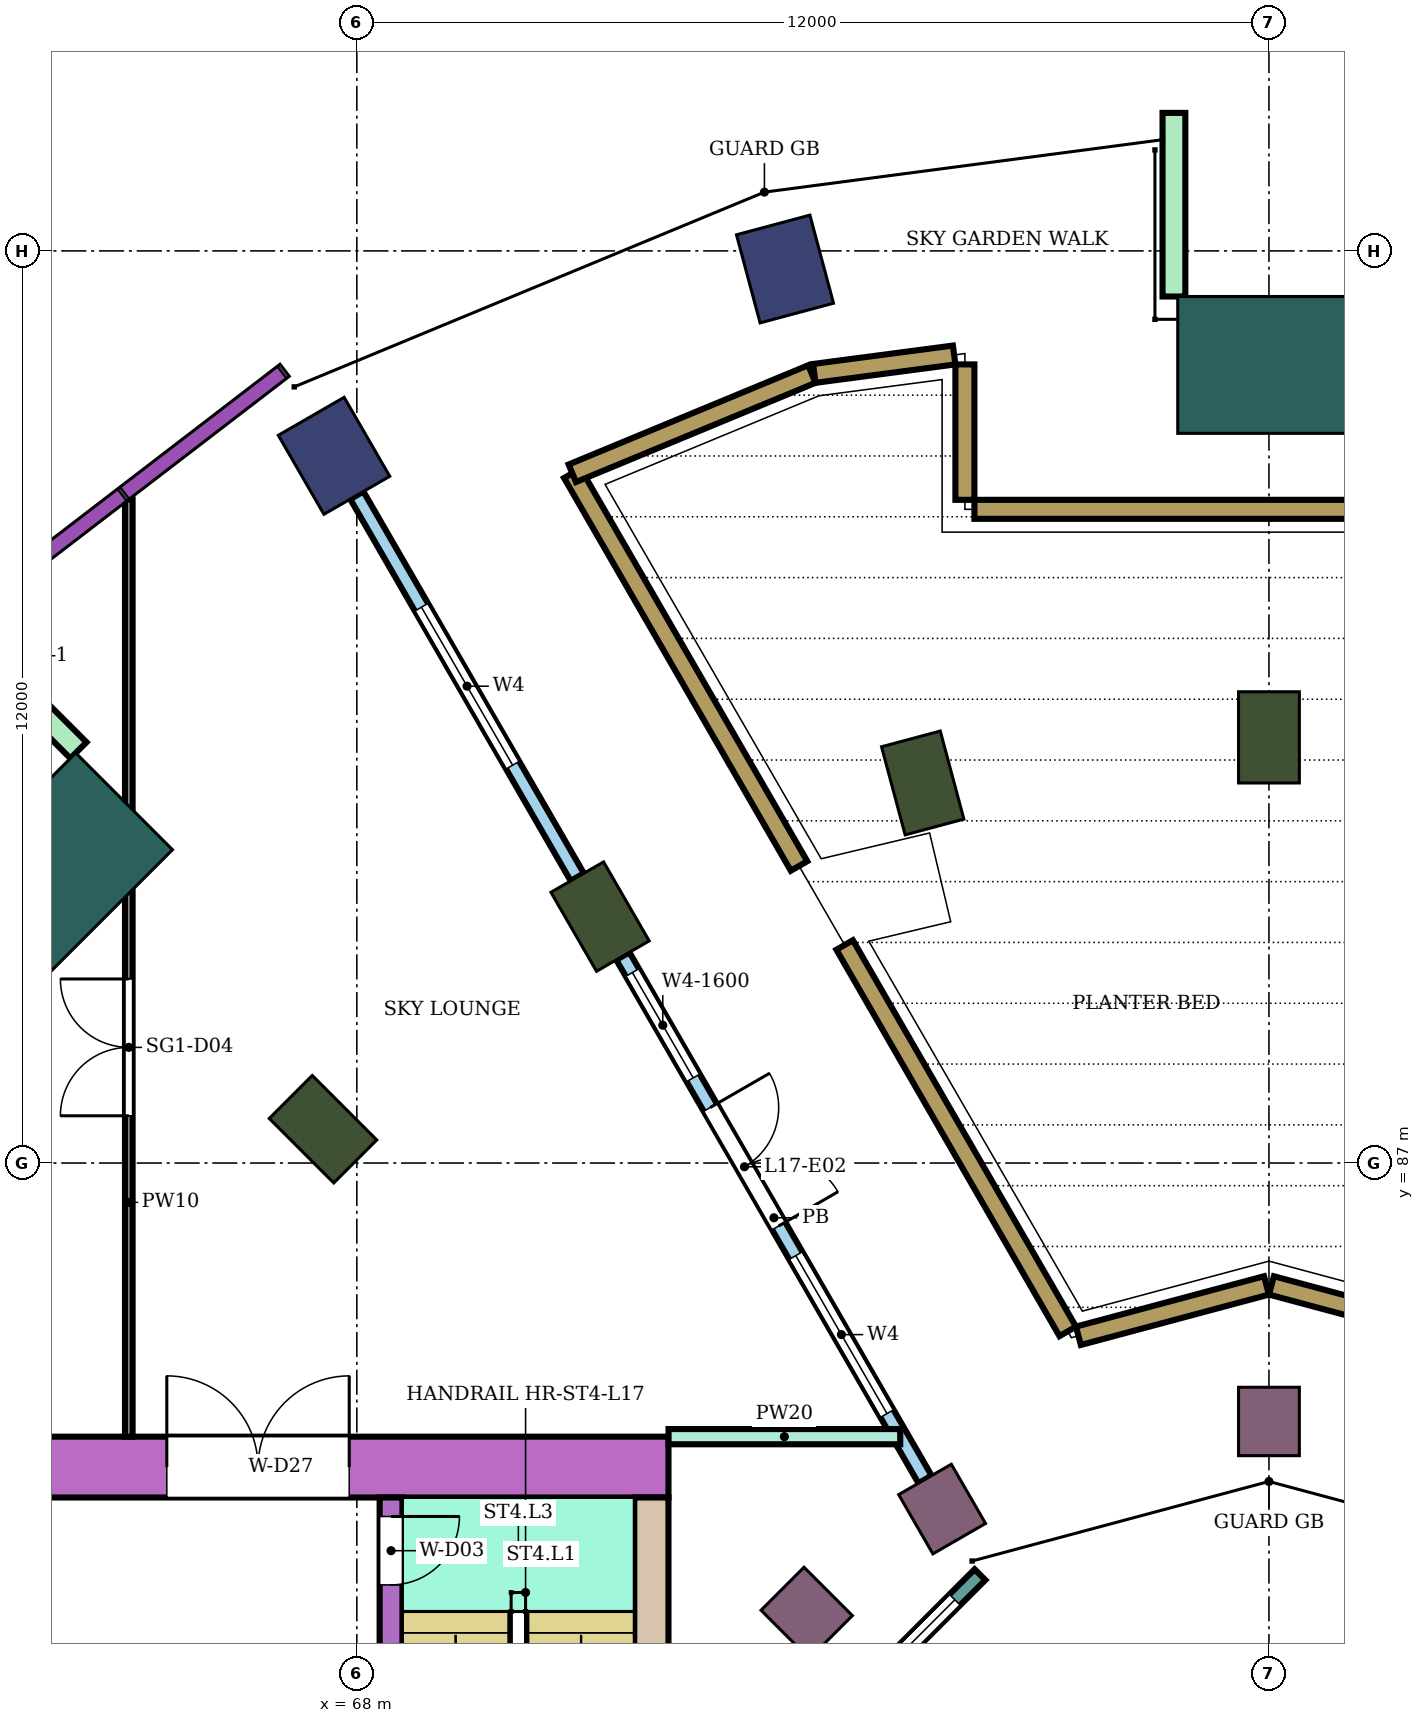
"""IFC4 building model, lengths in metres.
Left out: names, types, materials, properties, quantities, classifications, styles, units other than length and angle.
Written with IfcOpenShell. Run it as: python <this file> out.ifc"""

import sys

from ifc_helpers import new_model, si_unit, direction, frame, frame_2d, origin, origin_2d, place, context, subcontext, project, spatial, rectangle, extrude, element, fill, save


model = new_model("IFC4")
c1 = context("Model", 3, precision=1e-05, world=origin(), true_north=direction((0.0, 1.0)))
c2 = subcontext(c1, "Body", "Model", "MODEL_VIEW")
j1 = project(units=[si_unit("LENGTHUNIT", "METRE"), si_unit("PLANEANGLEUNIT", "RADIAN")], contexts=[c1])
p1 = place(None, origin())
s1 = spatial("IfcSite", under=j1, at=p1, CompositionType="ELEMENT")
p2 = place(p1, origin())
s2 = spatial("IfcBuilding", under=s1, at=p2, CompositionType="ELEMENT")
p3 = place(p2, frame((0.0, 0.0, 74.4)))
s3 = spatial("IfcBuildingStorey", under=s2, at=p3, CompositionType="ELEMENT", Elevation=74.4)
for number, where, z_axis, x_axis in (
    (1, (73.633, 98.762, 0.0), (0.0, 0.0, 1.0), (-0.259, 0.966, 0.0)),
    (2, (67.7, 96.304, 0.0), (0.0, 0.0, 1.0), (-0.5, 0.866, 0.0)),
):
    element("IfcColumn", number, at=place(p3, frame(where, z_axis=z_axis, x_axis=x_axis)), inside=s3, PredefinedType="COLUMN", context=c2, shape_type="SweptSolid", body=[
        extrude(rectangle(XDim=1.2, YDim=1.0, at=origin_2d()), origin(), (0.0, 0.0, 1.0), 8.0),
    ])
for number, where, z_axis, x_axis in (
    (3, (80.0, 92.6, 0.0), (0.0, 0.0, 1.0), (0.0, 1.0, 0.0)),
    (4, (75.445, 92.0, 0.0), (0.0, 0.0, 1.0), (-0.259, 0.966, 0.0)),
    (5, (71.2, 90.242, 0.0), (0.0, 0.0, 1.0), (-0.5, 0.866, 0.0)),
    (6, (67.555, 87.445, 0.0), (0.0, 0.0, 1.0), (-0.707, 0.707, 0.0)),
):
    element("IfcColumn", number, at=place(p3, frame(where, z_axis=z_axis, x_axis=x_axis)), inside=s3, PredefinedType="COLUMN", context=c2, shape_type="SweptSolid", body=[
        extrude(rectangle(XDim=1.2, YDim=0.8, at=origin_2d()), origin(), (0.0, 0.0, 1.0), 8.0),
    ])
for number, where, z_axis, x_axis in (
    (7, (80.0, 83.6, 0.0), (0.0, 0.0, 1.0), (0.0, 1.0, 0.0)),
    (8, (75.7, 82.448, 0.0), (0.0, 0.0, 1.0), (-0.5, 0.866, 0.0)),
    (9, (73.919, 81.081, 0.0), (0.0, 0.0, 1.0), (-0.707, 0.707, 0.0)),
):
    element("IfcColumn", number, at=place(p3, frame(where, z_axis=z_axis, x_axis=x_axis)), inside=s3, PredefinedType="COLUMN", context=c2, shape_type="SweptSolid", body=[
        extrude(rectangle(XDim=0.9, YDim=0.8, at=origin_2d()), origin(), (0.0, 0.0, 1.0), 8.0),
    ])
for number, where, z_axis, x_axis in (
    (10, (80.0, 97.5, 0.0), (0.0, 0.0, 1.0), (0.0, 1.0, 0.0)),
    (11, (64.09, 90.91, 0.0), (0.0, 0.0, 1.0), (-0.707, 0.707, 0.0)),
):
    element("IfcColumn", number, at=place(p3, frame(where, z_axis=z_axis, x_axis=x_axis)), inside=s3, PredefinedType="COLUMN", context=c2, shape_type="SweptSolid", body=[
        extrude(rectangle(XDim=1.8, YDim=2.4, at=origin_2d()), origin(), (0.0, 0.0, 1.0), 8.0),
    ])
p4 = place(p3, frame((72.1, 83.0, 0.0), z_axis=(0.0, 0.0, 1.0), x_axis=(-1.0, 0.0, 0.0)))
e12 = element("IfcWall", 12, at=p4, inside=s3, PredefinedType="SHEAR", context=c2, shape_type="SweptSolid", body=[
    extrude(rectangle(XDim=14.7, YDim=0.8, at=frame_2d((7.35, 0.0))), origin(), (0.0, 0.0, 1.0), 7.68),
])
p5 = place(p4, frame((4.2, 0.0, 0.0)))
e13 = element("IfcOpeningElement", 13, at=p5, cuts=e12, PredefinedType="OPENING", context=c2, shape_type="SweptSolid", body=[
    extrude(rectangle(XDim=2.4, YDim=2.4, at=frame_2d((1.2, 1.2))), frame((0.0, 0.41, 0.0), z_axis=(0.0, -1.0, 0.0), x_axis=(1.0, 0.0, 0.0)), (0.0, 0.0, 1.0), 0.82),
])
p6 = place(p3, frame((71.875, 82.6, 0.0), z_axis=(0.0, 0.0, 1.0), x_axis=(0.0, -1.0, 0.0)))
e14 = element("IfcWall", 14, at=p6, inside=s3, PredefinedType="SHEAR", context=c2, shape_type="SweptSolid", body=[
    extrude(rectangle(XDim=7.6, YDim=0.45, at=frame_2d((3.8, 0.0))), origin(), (0.0, 0.0, 1.0), 7.68),
])
p7 = place(p3, frame((68.45, 82.6, 0.0), z_axis=(0.0, 0.0, 1.0), x_axis=(0.0, -1.0, 0.0)))
e15 = element("IfcWall", 15, at=p7, inside=s3, PredefinedType="SHEAR", context=c2, shape_type="SweptSolid", body=[
    extrude(rectangle(XDim=7.6, YDim=0.3, at=frame_2d((3.8, 0.0))), origin(), (0.0, 0.0, 1.0), 7.68),
])
p8 = place(p7, frame((0.25, 0.0, 0.0)))
e16 = element("IfcOpeningElement", 16, at=p8, cuts=e15, PredefinedType="OPENING", context=c2, shape_type="SweptSolid", body=[
    extrude(rectangle(XDim=0.9, YDim=2.1, at=frame_2d((0.45, 1.05))), frame((0.0, 0.16, 0.0), z_axis=(0.0, -1.0, 0.0), x_axis=(1.0, 0.0, 0.0)), (0.0, 0.0, 1.0), 0.32),
])
for number, where, z_axis, x_axis in (
    (17, (78.75, 98.4, 0.0), (0.0, 0.0, 1.0), (0.0, 1.0, 0.0)),
    (18, (64.338, 92.43, 0.0), (0.0, 0.0, 1.0), (-0.707, 0.707, 0.0)),
):
    element("IfcWall", number, at=place(p3, frame(where, z_axis=z_axis, x_axis=x_axis)), inside=s3, PredefinedType="NOTDEFINED", context=c2, shape_type="SweptSolid", body=[
        extrude(rectangle(XDim=2.416, YDim=0.3, at=frame_2d((1.208, 0.0))), origin(), (0.0, 0.0, 1.0), 8.0),
    ])
p9 = place(p3, frame((76.198, 81.585, 0.0), z_axis=(0.0, 0.0, 1.0), x_axis=(-0.707106781187, -0.707106781187, 0.0)))
e19 = element("IfcWall", 19, at=p9, inside=s3, PredefinedType="NOTDEFINED", context=c2, shape_type="SweptSolid", body=[
    extrude(rectangle(XDim=3.936, YDim=0.2, at=frame_2d((1.968, 0.0))), origin(), (0.0, 0.0, 1.0), 8.0),
])
p10 = place(p9, frame((0.468, 0.0, 0.9)))
e20 = element("IfcOpeningElement", 20, at=p10, cuts=e19, PredefinedType="OPENING", context=c2, shape_type="SweptSolid", body=[
    extrude(rectangle(XDim=3.0, YDim=2.3, at=frame_2d((1.5, 1.15))), frame((0.0, 0.11, 0.0), z_axis=(0.0, -1.0, 0.0), x_axis=(1.0, 0.0, 0.0)), (0.0, 0.0, 1.0), 0.22),
])
p11 = place(p3, frame((70.835, 96.074, 0.0), z_axis=(0.0, 0.0, 1.0), x_axis=(0.500003486784, -0.866023390679, 0.0)))
e21 = element("IfcWall", 21, at=p11, inside=s3, PredefinedType="USERDEFINED", context=c2, shape_type="SweptSolid", body=[
    extrude(rectangle(XDim=5.966, YDim=0.25, at=frame_2d((2.983, 0.0))), origin(), (0.0, 0.0, 1.0), 0.6),
])
p12 = place(p3, frame((74.418, 89.869, 0.0), z_axis=(0.0, 0.0, 1.0), x_axis=(0.499999689456, -0.866025583077, 0.0)))
e22 = element("IfcWall", 22, at=p12, inside=s3, PredefinedType="USERDEFINED", context=c2, shape_type="SweptSolid", body=[
    extrude(rectangle(XDim=5.87, YDim=0.25, at=frame_2d((2.935, 0.0))), origin(), (0.0, 0.0, 1.0), 0.6),
])
for number, where, z_axis, x_axis in (
    (23, (77.493, 84.727, 0.0), (0.0, 0.0, 1.0), (0.966, 0.259, 0.0)),
    (24, (80.032, 85.39, 0.0), (0.0, 0.0, 1.0), (0.966, -0.259, 0.0)),
):
    element("IfcWall", number, at=place(p3, frame(where, z_axis=z_axis, x_axis=x_axis)), inside=s3, PredefinedType="USERDEFINED", context=c2, shape_type="SweptSolid", body=[
        extrude(rectangle(XDim=2.562, YDim=0.25, at=frame_2d((1.281, 0.0))), origin(), (0.0, 0.0, 1.0), 0.6),
    ])
p13 = place(p3, frame((83.875, 95.6, 0.0), z_axis=(0.0, 0.0, 1.0), x_axis=(-1.0, 0.0, 0.0)))
e25 = element("IfcWall", 25, at=p13, inside=s3, PredefinedType="USERDEFINED", context=c2, shape_type="SweptSolid", body=[
    extrude(rectangle(XDim=7.75, YDim=0.25, at=frame_2d((3.875, 0.0))), origin(), (0.0, 0.0, 1.0), 0.6),
])
p14 = place(p3, frame((76.0, 95.725, 0.0), z_axis=(0.0, 0.0, 1.0), x_axis=(0.0, 1.0, 0.0)))
e26 = element("IfcWall", 26, at=p14, inside=s3, PredefinedType="USERDEFINED", context=c2, shape_type="SweptSolid", body=[
    extrude(rectangle(XDim=1.781, YDim=0.25, at=frame_2d((0.891, 0.0))), origin(), (0.0, 0.0, 1.0), 0.6),
])
p15 = place(p3, frame((75.859, 97.631, 0.0), z_axis=(0.0, 0.0, 1.0), x_axis=(-0.991436829887, -0.130587182926, 0.0)))
e27 = element("IfcWall", 27, at=p15, inside=s3, PredefinedType="USERDEFINED", context=c2, shape_type="SweptSolid", body=[
    extrude(rectangle(XDim=1.856, YDim=0.25, at=frame_2d((0.928, 0.0))), origin(), (0.0, 0.0, 1.0), 0.6),
])
p16 = place(p3, frame((73.986, 97.38, 0.0), z_axis=(0.0, 0.0, 1.0), x_axis=(-0.923871147788, -0.38270367425, 0.0)))
e28 = element("IfcWall", 28, at=p16, inside=s3, PredefinedType="USERDEFINED", context=c2, shape_type="SweptSolid", body=[
    extrude(rectangle(XDim=3.411, YDim=0.25, at=frame_2d((1.706, 0.0))), origin(), (0.0, 0.0, 1.0), 0.6),
])
p17 = place(p3, frame((75.475, 82.838, 0.0), z_axis=(0.0, 0.0, 1.0), x_axis=(-0.50001663867, 0.86601579723, 0.0)))
e29 = element("IfcWall", 29, at=p17, inside=s3, PredefinedType="NOTDEFINED", context=c2, shape_type="SweptSolid", body=[
    extrude(rectangle(XDim=7.95, YDim=0.2, at=frame_2d((3.975, 0.0))), origin(), (0.0, 0.0, 1.0), 8.0),
])
p18 = place(p17, frame((1.0, 0.0, 0.3)))
e30 = element("IfcOpeningElement", 30, at=p18, cuts=e29, PredefinedType="OPENING", context=c2, shape_type="SweptSolid", body=[
    extrude(rectangle(XDim=2.4, YDim=3.6, at=frame_2d((1.2, 1.8))), frame((0.0, 0.11, 0.0), z_axis=(0.0, -1.0, 0.0), x_axis=(1.0, 0.0, 0.0)), (0.0, 0.0, 1.0), 0.22),
])
p19 = place(p17, frame((3.85, 0.0, 0.0)))
e31 = element("IfcOpeningElement", 31, at=p19, cuts=e29, PredefinedType="OPENING", context=c2, shape_type="SweptSolid", body=[
    extrude(rectangle(XDim=1.8, YDim=2.4, at=frame_2d((0.9, 1.2))), frame((0.0, 0.11, 0.0), z_axis=(0.0, -1.0, 0.0), x_axis=(1.0, 0.0, 0.0)), (0.0, 0.0, 1.0), 0.22),
])
p20 = place(p17, frame((6.1, 0.0, 0.3)))
e32 = element("IfcOpeningElement", 32, at=p20, cuts=e29, PredefinedType="OPENING", context=c2, shape_type="SweptSolid", body=[
    extrude(rectangle(XDim=1.6, YDim=3.6, at=frame_2d((0.8, 1.8))), frame((0.0, 0.11, 0.0), z_axis=(0.0, -1.0, 0.0), x_axis=(1.0, 0.0, 0.0)), (0.0, 0.0, 1.0), 0.22),
])
p21 = place(p3, frame((70.9, 90.762, 0.0), z_axis=(0.0, 0.0, 1.0), x_axis=(-0.499987231761, 0.866032775405, 0.0)))
e33 = element("IfcWall", 33, at=p21, inside=s3, PredefinedType="NOTDEFINED", context=c2, shape_type="SweptSolid", body=[
    extrude(rectangle(XDim=5.8, YDim=0.2, at=frame_2d((2.9, 0.0))), origin(), (0.0, 0.0, 1.0), 8.0),
])
p22 = place(p21, frame((1.7, 0.0, 0.3)))
e34 = element("IfcOpeningElement", 34, at=p22, cuts=e33, PredefinedType="OPENING", context=c2, shape_type="SweptSolid", body=[
    extrude(rectangle(XDim=2.4, YDim=3.6, at=frame_2d((1.2, 1.8))), frame((0.0, 0.11, 0.0), z_axis=(0.0, -1.0, 0.0), x_axis=(1.0, 0.0, 0.0)), (0.0, 0.0, 1.0), 0.22),
])
p23 = place(p3, frame((72.101, 83.4, 0.0), z_axis=(0.0, 0.0, 1.0), x_axis=(1.0, 0.0, 0.0)))
e35 = element("IfcWall", 35, at=p23, inside=s3, PredefinedType="PARTITIONING", context=c2, shape_type="SweptSolid", body=[
    extrude(rectangle(XDim=3.048, YDim=0.2, at=frame_2d((1.524, 0.0))), origin(), (0.0, 0.0, 1.0), 7.55),
])
p24 = place(p3, frame((65.0, 83.4, 0.0), z_axis=(0.0, 0.0, 1.0), x_axis=(0.0, 1.0, 0.0)))
e36 = element("IfcWall", 36, at=p24, inside=s3, PredefinedType="PARTITIONING", context=c2, shape_type="SweptSolid", body=[
    extrude(rectangle(XDim=12.33, YDim=0.1, at=frame_2d((6.165, 0.0))), origin(), (0.0, 0.0, 1.0), 7.55),
])
p25 = place(p24, frame((4.221, 0.0, 0.0)))
e37 = element("IfcOpeningElement", 37, at=p25, cuts=e36, PredefinedType="OPENING", context=c2, shape_type="SweptSolid", body=[
    extrude(rectangle(XDim=1.8, YDim=2.1, at=frame_2d((0.9, 1.05))), frame((0.0, 0.06, 0.0), z_axis=(0.0, -1.0, 0.0), x_axis=(1.0, 0.0, 0.0)), (0.0, 0.0, 1.0), 0.12),
])
p26 = place(p10, origin())
e38 = element("IfcWindow", 38, at=p26, inside=s3, PartitioningType="SINGLE_PANEL", PredefinedType="WINDOW", context=c2, shape_type="SweptSolid", body=[
    extrude(rectangle(XDim=3.0, YDim=2.3, at=frame_2d((1.5, 1.15))), frame((0.0, 0.03, 0.0), z_axis=(0.0, -1.0, 0.0), x_axis=(1.0, 0.0, 0.0)), (0.0, 0.0, 1.0), 0.06),
])
fill(e20, e38)
p27 = place(p18, origin())
e39 = element("IfcWindow", 39, at=p27, inside=s3, PartitioningType="SINGLE_PANEL", PredefinedType="WINDOW", context=c2, shape_type="SweptSolid", body=[
    extrude(rectangle(XDim=2.4, YDim=3.6, at=frame_2d((1.2, 1.8))), frame((0.0, 0.03, 0.0), z_axis=(0.0, -1.0, 0.0), x_axis=(1.0, 0.0, 0.0)), (0.0, 0.0, 1.0), 0.06),
])
fill(e30, e39)
p28 = place(p19, frame((1.8, 0.0, 0.0), z_axis=(0.0, 0.0, 1.0), x_axis=(-1.0, 0.0, 0.0)))
e40 = element("IfcDoor", 40, at=p28, inside=s3, OperationType="DOUBLE_DOOR_SINGLE_SWING", PredefinedType="DOOR", context=c2, shape_type="SweptSolid", body=[
    extrude(rectangle(XDim=1.8, YDim=2.4, at=frame_2d((0.9, 1.2))), frame((0.0, 0.025, 0.0), z_axis=(0.0, -1.0, 0.0), x_axis=(1.0, 0.0, 0.0)), (0.0, 0.0, 1.0), 0.05),
])
fill(e31, e40)
p29 = place(p20, origin())
e41 = element("IfcWindow", 41, at=p29, inside=s3, PartitioningType="SINGLE_PANEL", PredefinedType="WINDOW", context=c2, shape_type="SweptSolid", body=[
    extrude(rectangle(XDim=1.6, YDim=3.6, at=frame_2d((0.8, 1.8))), frame((0.0, 0.03, 0.0), z_axis=(0.0, -1.0, 0.0), x_axis=(1.0, 0.0, 0.0)), (0.0, 0.0, 1.0), 0.06),
])
fill(e32, e41)
p30 = place(p22, origin())
e42 = element("IfcWindow", 42, at=p30, inside=s3, PartitioningType="SINGLE_PANEL", PredefinedType="WINDOW", context=c2, shape_type="SweptSolid", body=[
    extrude(rectangle(XDim=2.4, YDim=3.6, at=frame_2d((1.2, 1.8))), frame((0.0, 0.03, 0.0), z_axis=(0.0, -1.0, 0.0), x_axis=(1.0, 0.0, 0.0)), (0.0, 0.0, 1.0), 0.06),
])
fill(e34, e42)
p31 = place(p25, origin())
e43 = element("IfcDoor", 43, at=p31, inside=s3, OperationType="DOUBLE_DOOR_SINGLE_SWING", PredefinedType="DOOR", context=c2, shape_type="SweptSolid", body=[
    extrude(rectangle(XDim=1.8, YDim=2.1, at=frame_2d((0.9, 1.05))), frame((0.0, 0.025, 0.0), z_axis=(0.0, -1.0, 0.0), x_axis=(1.0, 0.0, 0.0)), (0.0, 0.0, 1.0), 0.05),
])
fill(e37, e43)
p32 = place(p8, origin())
e44 = element("IfcDoor", 44, at=p32, inside=s3, OperationType="SINGLE_SWING_LEFT", PredefinedType="DOOR", context=c2, shape_type="SweptSolid", body=[
    extrude(rectangle(XDim=0.9, YDim=2.1, at=frame_2d((0.45, 1.05))), frame((0.0, 0.025, 0.0), z_axis=(0.0, -1.0, 0.0), x_axis=(1.0, 0.0, 0.0)), (0.0, 0.0, 1.0), 0.05),
])
fill(e16, e44)
p33 = place(p5, frame((2.4, 0.0, 0.0), z_axis=(0.0, 0.0, 1.0), x_axis=(-1.0, 0.0, 0.0)))
e45 = element("IfcDoor", 45, at=p33, inside=s3, OperationType="DOUBLE_DOOR_SINGLE_SWING", PredefinedType="DOOR", context=c2, shape_type="SweptSolid", body=[
    extrude(rectangle(XDim=2.4, YDim=2.4, at=frame_2d((1.2, 1.2))), frame((0.0, 0.025, 0.0), z_axis=(0.0, -1.0, 0.0), x_axis=(1.0, 0.0, 0.0)), (0.0, 0.0, 1.0), 0.05),
])
fill(e13, e45)
save(model, sys.argv[1])
